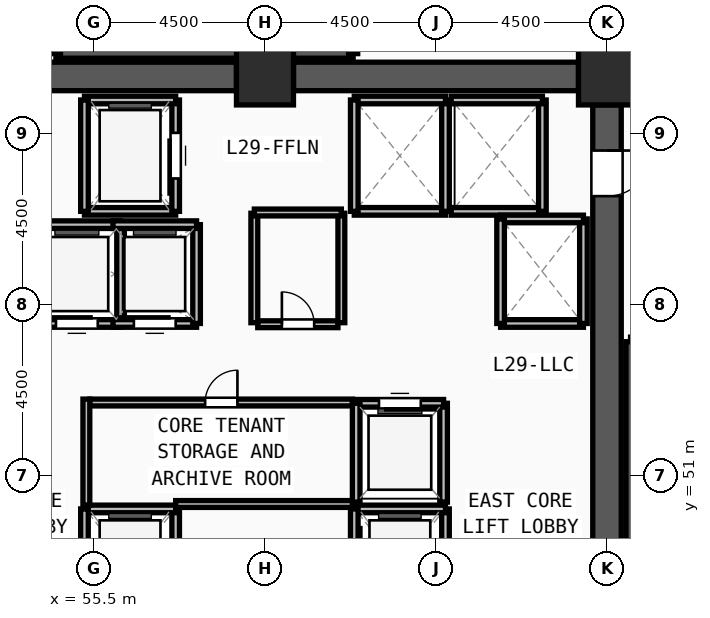
"""IFC4 building model, lengths in metres.
Left out: names, types, materials, properties, quantities, classifications, styles, units other than length and angle.
Written with IfcOpenShell. Run it as: python <this file> out.ifc"""

import sys

from ifc_helpers import new_model, si_unit, direction, frame, frame_2d, origin, origin_2d, place, context, subcontext, project, spatial, rectangle, extrude, source, transform, mapped, element, fill, save


model = new_model("IFC4")
c1 = context("Model", 3, precision=1e-05, world=origin(), true_north=direction((0.0, 1.0)))
c2 = subcontext(c1, "Body", "Model", "MODEL_VIEW")
j1 = project(units=[si_unit("LENGTHUNIT", "METRE"), si_unit("PLANEANGLEUNIT", "RADIAN")], contexts=[c1])
p1 = place(None, origin())
s1 = spatial("IfcSite", under=j1, at=p1, CompositionType="ELEMENT")
p2 = place(p1, origin())
s2 = spatial("IfcBuilding", under=s1, at=p2, CompositionType="ELEMENT")
p3 = place(p2, frame((0.0, 0.0, 113.25)))
s3 = spatial("IfcBuildingStorey", under=s2, at=p3, CompositionType="ELEMENT", Elevation=113.25)
m1 = source(origin(), c2, "Body", "SweptSolid", [
    extrude(rectangle(XDim=1.5, YDim=1.5, at=origin_2d()), origin(), (0.0, 0.0, 1.0), 3.75),
])
for number, where, z_axis, x_axis in (
    (1, (69.0, 61.5, 0.0), (0.0, 0.0, 1.0), (1.0, 0.0, 0.0)),
    (2, (60.0, 61.5, 0.0), (0.0, 0.0, 1.0), (1.0, 0.0, 0.0)),
):
    element("IfcColumn", number, at=place(p3, frame(where, z_axis=z_axis, x_axis=x_axis)), inside=s3, PredefinedType="COLUMN", context=c2, shape_type="MappedRepresentation", body=[
        mapped(m1, transform((0.0, 0.0, 0.0), x_axis=(1.0, 0.0, 0.0), y_axis=(0.0, 1.0, 0.0), z_axis=(0.0, 0.0, 1.0), scale=1.0)),
    ])
for number, where, z_axis, x_axis in (
    (3, (51.75, 61.5, 0.0), (0.0, 0.0, 1.0), (1.0, 0.0, 0.0)),
    (4, (60.75, 61.5, 0.0), (0.0, 0.0, 1.0), (1.0, 0.0, 0.0)),
):
    element("IfcWall", number, at=place(p3, frame(where, z_axis=z_axis, x_axis=x_axis)), inside=s3, PredefinedType="SHEAR", context=c2, shape_type="SweptSolid", body=[
        extrude(rectangle(XDim=7.5, YDim=0.75, at=frame_2d((3.75, 0.0))), origin(), (0.0, 0.0, 1.0), 3.57),
    ])
p4 = place(p3, frame((69.0, 60.75, 0.0), z_axis=(0.0, 0.0, 1.0), x_axis=(0.0, -1.0, 0.0)))
e5 = element("IfcWall", 5, at=p4, inside=s3, PredefinedType="SHEAR", context=c2, shape_type="SweptSolid", body=[
    extrude(rectangle(XDim=13.5, YDim=0.75, at=frame_2d((6.75, 0.0))), origin(), (0.0, 0.0, 1.0), 3.57),
])
m2 = source(origin(), c2, "Body", "SweptSolid", [
    extrude(rectangle(XDim=1.2, YDim=2.2, at=frame_2d((0.6, 1.1))), frame((0.0, 0.385, 0.0), z_axis=(0.0, -1.0, 0.0), x_axis=(1.0, 0.0, 0.0)), (0.0, 0.0, 1.0), 0.77),
])
p5 = place(p4, frame((1.2, 0.0, 0.0)))
e6 = element("IfcOpeningElement", 6, at=p5, cuts=e5, PredefinedType="OPENING", context=c2, shape_type="MappedRepresentation", body=[
    mapped(m2, transform((0.0, 0.0, 0.0), x_axis=(1.0, 0.0, 0.0), y_axis=(0.0, 1.0, 0.0), z_axis=(0.0, 0.0, 1.0), scale=1.0)),
])
for number, where, z_axis, x_axis in (
    (7, (69.62, 54.52, 0.0), (0.0, 0.0, 1.0), (0.0, -1.0, 0.0)),
    (8, (54.5, 62.1, 0.0), (0.0, 0.0, 1.0), (1.0, 0.0, 0.0)),
):
    element("IfcWall", number, at=place(p3, frame(where, z_axis=z_axis, x_axis=x_axis)), inside=s3, PredefinedType="SOLIDWALL", context=c2, shape_type="SweptSolid", body=[
        extrude(rectangle(XDim=7.82, YDim=0.24, at=frame_2d((3.91, 0.0))), origin(), (0.0, 0.0, 1.0), 3.57),
    ])
for number, where, z_axis, x_axis in (
    (9, (62.32, 62.1, 0.0), (0.0, 0.0, 1.0), (0.0, 1.0, 0.0)),
    (10, (54.5, 65.54, 0.0), (0.0, 0.0, 1.0), (0.0, -1.0, 0.0)),
):
    element("IfcWall", number, at=place(p3, frame(where, z_axis=z_axis, x_axis=x_axis)), inside=s3, PredefinedType="SOLIDWALL", context=c2, shape_type="SweptSolid", body=[
        extrude(rectangle(XDim=3.44, YDim=0.24, at=frame_2d((1.72, 0.0))), origin(), (0.0, 0.0, 1.0), 3.57),
    ])
p6 = place(p3, frame((57.65, 47.12, 0.0), z_axis=(0.0, 0.0, 1.0), x_axis=(0.0, 1.0, 0.0)))
e11 = element("IfcWall", 11, at=p6, inside=s3, PredefinedType="SOLIDWALL", context=c2, shape_type="SweptSolid", body=[
    extrude(rectangle(XDim=3.0, YDim=0.2, at=frame_2d((1.5, 0.0))), origin(), (0.0, 0.0, 1.0), 3.57),
])
m3 = source(origin(), c2, "Body", "SweptSolid", [
    extrude(rectangle(XDim=1.2, YDim=2.3, at=frame_2d((0.6, 1.15))), frame((0.0, 0.11, 0.0), z_axis=(0.0, -1.0, 0.0), x_axis=(1.0, 0.0, 0.0)), (0.0, 0.0, 1.0), 0.22),
])
p7 = place(p6, frame((0.9, 0.0, 0.0)))
e12 = element("IfcOpeningElement", 12, at=p7, cuts=e11, PredefinedType="OPENING", context=c2, shape_type="MappedRepresentation", body=[
    mapped(m3, transform((0.0, 0.0, 0.0), x_axis=(1.0, 0.0, 0.0), y_axis=(0.0, 1.0, 0.0), z_axis=(0.0, 0.0, 1.0), scale=1.0)),
])
p8 = place(p3, frame((57.65, 50.12, 0.0), z_axis=(0.0, 0.0, 1.0), x_axis=(-1.0, 0.0, 0.0)))
e13 = element("IfcWall", 13, at=p8, inside=s3, PredefinedType="SOLIDWALL", context=c2, shape_type="SweptSolid", body=[
    extrude(rectangle(XDim=2.4, YDim=0.2, at=frame_2d((1.2, 0.0))), origin(), (0.0, 0.0, 1.0), 3.57),
])
for number, where, z_axis, x_axis in (
    (14, (55.25, 50.12, 0.0), (0.0, 0.0, 1.0), (0.0, -1.0, 0.0)),
    (15, (64.75, 47.12, 0.0), (0.0, 0.0, 1.0), (0.0, 1.0, 0.0)),
):
    element("IfcWall", number, at=place(p3, frame(where, z_axis=z_axis, x_axis=x_axis)), inside=s3, PredefinedType="SOLIDWALL", context=c2, shape_type="SweptSolid", body=[
        extrude(rectangle(XDim=3.0, YDim=0.2, at=frame_2d((1.5, 0.0))), origin(), (0.0, 0.0, 1.0), 3.57),
    ])
p9 = place(p3, frame((64.75, 50.12, 0.0), z_axis=(0.0, 0.0, 1.0), x_axis=(-1.0, 0.0, 0.0)))
e16 = element("IfcWall", 16, at=p9, inside=s3, PredefinedType="SOLIDWALL", context=c2, shape_type="SweptSolid", body=[
    extrude(rectangle(XDim=2.4, YDim=0.2, at=frame_2d((1.2, 0.0))), origin(), (0.0, 0.0, 1.0), 3.57),
])
p10 = place(p3, frame((62.35, 50.12, 0.0), z_axis=(0.0, 0.0, 1.0), x_axis=(0.0, -1.0, 0.0)))
e17 = element("IfcWall", 17, at=p10, inside=s3, PredefinedType="SOLIDWALL", context=c2, shape_type="SweptSolid", body=[
    extrude(rectangle(XDim=3.0, YDim=0.2, at=frame_2d((1.5, 0.0))), origin(), (0.0, 0.0, 1.0), 3.57),
])
p11 = place(p10, frame((0.9, 0.0, 0.0)))
e18 = element("IfcOpeningElement", 18, at=p11, cuts=e17, PredefinedType="OPENING", context=c2, shape_type="MappedRepresentation", body=[
    mapped(m3, transform((0.0, 0.0, 0.0), x_axis=(1.0, 0.0, 0.0), y_axis=(0.0, 1.0, 0.0), z_axis=(0.0, 0.0, 1.0), scale=1.0)),
])
p12 = place(p3, frame((55.25, 57.95, 0.0), z_axis=(0.0, 0.0, 1.0), x_axis=(1.0, 0.0, 0.0)))
e19 = element("IfcWall", 19, at=p12, inside=s3, PredefinedType="SOLIDWALL", context=c2, shape_type="SweptSolid", body=[
    extrude(rectangle(XDim=2.4, YDim=0.2, at=frame_2d((1.2, 0.0))), origin(), (0.0, 0.0, 1.0), 3.57),
])
p13 = place(p3, frame((57.65, 57.95, 0.0), z_axis=(0.0, 0.0, 1.0), x_axis=(0.0, 1.0, 0.0)))
e20 = element("IfcWall", 20, at=p13, inside=s3, PredefinedType="SOLIDWALL", context=c2, shape_type="SweptSolid", body=[
    extrude(rectangle(XDim=2.93, YDim=0.2, at=frame_2d((1.465, 0.0))), origin(), (0.0, 0.0, 1.0), 3.57),
])
p14 = place(p13, frame((0.865, 0.0, 0.0)))
e21 = element("IfcOpeningElement", 21, at=p14, cuts=e20, PredefinedType="OPENING", context=c2, shape_type="MappedRepresentation", body=[
    mapped(m3, transform((0.0, 0.0, 0.0), x_axis=(1.0, 0.0, 0.0), y_axis=(0.0, 1.0, 0.0), z_axis=(0.0, 0.0, 1.0), scale=1.0)),
])
p15 = place(p3, frame((57.65, 60.88, 0.0), z_axis=(0.0, 0.0, 1.0), x_axis=(-1.0, 0.0, 0.0)))
e22 = element("IfcWall", 22, at=p15, inside=s3, PredefinedType="SOLIDWALL", context=c2, shape_type="SweptSolid", body=[
    extrude(rectangle(XDim=2.4, YDim=0.2, at=frame_2d((1.2, 0.0))), origin(), (0.0, 0.0, 1.0), 3.57),
])
p16 = place(p3, frame((55.25, 60.88, 0.0), z_axis=(0.0, 0.0, 1.0), x_axis=(0.0, -1.0, 0.0)))
e23 = element("IfcWall", 23, at=p16, inside=s3, PredefinedType="SOLIDWALL", context=c2, shape_type="SweptSolid", body=[
    extrude(rectangle(XDim=2.93, YDim=0.2, at=frame_2d((1.465, 0.0))), origin(), (0.0, 0.0, 1.0), 3.57),
])
p17 = place(p3, frame((62.35, 57.95, 0.0), z_axis=(0.0, 0.0, 1.0), x_axis=(1.0, 0.0, 0.0)))
e24 = element("IfcWall", 24, at=p17, inside=s3, PredefinedType="SOLIDWALL", context=c2, shape_type="SweptSolid", body=[
    extrude(rectangle(XDim=2.4, YDim=0.2, at=frame_2d((1.2, 0.0))), origin(), (0.0, 0.0, 1.0), 3.57),
])
p18 = place(p3, frame((64.75, 57.95, 0.0), z_axis=(0.0, 0.0, 1.0), x_axis=(0.0, 1.0, 0.0)))
e25 = element("IfcWall", 25, at=p18, inside=s3, PredefinedType="SOLIDWALL", context=c2, shape_type="SweptSolid", body=[
    extrude(rectangle(XDim=2.93, YDim=0.2, at=frame_2d((1.465, 0.0))), origin(), (0.0, 0.0, 1.0), 3.57),
])
p19 = place(p3, frame((64.75, 60.88, 0.0), z_axis=(0.0, 0.0, 1.0), x_axis=(-1.0, 0.0, 0.0)))
e26 = element("IfcWall", 26, at=p19, inside=s3, PredefinedType="SOLIDWALL", context=c2, shape_type="SweptSolid", body=[
    extrude(rectangle(XDim=2.4, YDim=0.2, at=frame_2d((1.2, 0.0))), origin(), (0.0, 0.0, 1.0), 3.57),
])
p20 = place(p3, frame((62.35, 60.88, 0.0), z_axis=(0.0, 0.0, 1.0), x_axis=(0.0, -1.0, 0.0)))
e27 = element("IfcWall", 27, at=p20, inside=s3, PredefinedType="SOLIDWALL", context=c2, shape_type="SweptSolid", body=[
    extrude(rectangle(XDim=2.93, YDim=0.2, at=frame_2d((1.465, 0.0))), origin(), (0.0, 0.0, 1.0), 3.57),
])
p21 = place(p3, frame((64.9, 57.95, 0.0), z_axis=(0.0, 0.0, 1.0), x_axis=(1.0, 0.0, 0.0)))
e28 = element("IfcWall", 28, at=p21, inside=s3, PredefinedType="SOLIDWALL", context=c2, shape_type="SweptSolid", body=[
    extrude(rectangle(XDim=2.4, YDim=0.2, at=frame_2d((1.2, 0.0))), origin(), (0.0, 0.0, 1.0), 3.57),
])
p22 = place(p3, frame((67.3, 57.95, 0.0), z_axis=(0.0, 0.0, 1.0), x_axis=(0.0, 1.0, 0.0)))
e29 = element("IfcWall", 29, at=p22, inside=s3, PredefinedType="SOLIDWALL", context=c2, shape_type="SweptSolid", body=[
    extrude(rectangle(XDim=2.93, YDim=0.2, at=frame_2d((1.465, 0.0))), origin(), (0.0, 0.0, 1.0), 3.57),
])
p23 = place(p3, frame((67.3, 60.88, 0.0), z_axis=(0.0, 0.0, 1.0), x_axis=(-1.0, 0.0, 0.0)))
e30 = element("IfcWall", 30, at=p23, inside=s3, PredefinedType="SOLIDWALL", context=c2, shape_type="SweptSolid", body=[
    extrude(rectangle(XDim=2.4, YDim=0.2, at=frame_2d((1.2, 0.0))), origin(), (0.0, 0.0, 1.0), 3.57),
])
p24 = place(p3, frame((66.2, 55.0, 0.0), z_axis=(0.0, 0.0, 1.0), x_axis=(1.0, 0.0, 0.0)))
e31 = element("IfcWall", 31, at=p24, inside=s3, PredefinedType="SOLIDWALL", context=c2, shape_type="SweptSolid", body=[
    extrude(rectangle(XDim=2.18, YDim=0.2, at=frame_2d((1.09, 0.0))), origin(), (0.0, 0.0, 1.0), 3.57),
])
p25 = place(p3, frame((68.38, 55.0, 0.0), z_axis=(0.0, 0.0, 1.0), x_axis=(0.0, 1.0, 0.0)))
e32 = element("IfcWall", 32, at=p25, inside=s3, PredefinedType="SOLIDWALL", context=c2, shape_type="SweptSolid", body=[
    extrude(rectangle(XDim=2.75, YDim=0.2, at=frame_2d((1.375, 0.0))), origin(), (0.0, 0.0, 1.0), 3.57),
])
p26 = place(p3, frame((68.38, 57.75, 0.0), z_axis=(0.0, 0.0, 1.0), x_axis=(-1.0, 0.0, 0.0)))
e33 = element("IfcWall", 33, at=p26, inside=s3, PredefinedType="SOLIDWALL", context=c2, shape_type="SweptSolid", body=[
    extrude(rectangle(XDim=2.18, YDim=0.2, at=frame_2d((1.09, 0.0))), origin(), (0.0, 0.0, 1.0), 3.57),
])
p27 = place(p3, frame((66.2, 57.75, 0.0), z_axis=(0.0, 0.0, 1.0), x_axis=(0.0, -1.0, 0.0)))
e34 = element("IfcWall", 34, at=p27, inside=s3, PredefinedType="SOLIDWALL", context=c2, shape_type="SweptSolid", body=[
    extrude(rectangle(XDim=2.75, YDim=0.2, at=frame_2d((1.375, 0.0))), origin(), (0.0, 0.0, 1.0), 3.57),
])
p28 = place(p3, frame((64.7, 50.3, 0.0), z_axis=(0.0, 0.0, 1.0), x_axis=(0.0, 1.0, 0.0)))
e35 = element("IfcWall", 35, at=p28, inside=s3, PredefinedType="SOLIDWALL", context=c2, shape_type="SweptSolid", body=[
    extrude(rectangle(XDim=2.6, YDim=0.2, at=frame_2d((1.3, 0.0))), origin(), (0.0, 0.0, 1.0), 3.57),
])
p29 = place(p3, frame((64.7, 52.9, 0.0), z_axis=(0.0, 0.0, 1.0), x_axis=(-1.0, 0.0, 0.0)))
e36 = element("IfcWall", 36, at=p29, inside=s3, PredefinedType="SOLIDWALL", context=c2, shape_type="SweptSolid", body=[
    extrude(rectangle(XDim=2.3, YDim=0.2, at=frame_2d((1.15, 0.0))), origin(), (0.0, 0.0, 1.0), 3.57),
])
m4 = source(origin(), c2, "Body", "SweptSolid", [
    extrude(rectangle(XDim=1.1, YDim=2.2, at=frame_2d((0.55, 1.1))), frame((0.0, 0.11, 0.0), z_axis=(0.0, -1.0, 0.0), x_axis=(1.0, 0.0, 0.0)), (0.0, 0.0, 1.0), 0.22),
])
p30 = place(p29, frame((0.6, 0.0, 0.0)))
e37 = element("IfcOpeningElement", 37, at=p30, cuts=e36, PredefinedType="OPENING", context=c2, shape_type="MappedRepresentation", body=[
    mapped(m4, transform((0.0, 0.0, 0.0), x_axis=(1.0, 0.0, 0.0), y_axis=(0.0, 1.0, 0.0), z_axis=(0.0, 0.0, 1.0), scale=1.0)),
])
p31 = place(p3, frame((62.4, 52.9, 0.0), z_axis=(0.0, 0.0, 1.0), x_axis=(0.0, -1.0, 0.0)))
e38 = element("IfcWall", 38, at=p31, inside=s3, PredefinedType="SOLIDWALL", context=c2, shape_type="SweptSolid", body=[
    extrude(rectangle(XDim=2.6, YDim=0.2, at=frame_2d((1.3, 0.0))), origin(), (0.0, 0.0, 1.0), 3.57),
])
p32 = place(p3, frame((53.9, 55.0, 0.0), z_axis=(0.0, 0.0, 1.0), x_axis=(1.0, 0.0, 0.0)))
e39 = element("IfcWall", 39, at=p32, inside=s3, PredefinedType="SOLIDWALL", context=c2, shape_type="SweptSolid", body=[
    extrude(rectangle(XDim=2.3, YDim=0.2, at=frame_2d((1.15, 0.0))), origin(), (0.0, 0.0, 1.0), 3.57),
])
p33 = place(p32, frame((0.6, 0.0, 0.0)))
e40 = element("IfcOpeningElement", 40, at=p33, cuts=e39, PredefinedType="OPENING", context=c2, shape_type="MappedRepresentation", body=[
    mapped(m4, transform((0.0, 0.0, 0.0), x_axis=(1.0, 0.0, 0.0), y_axis=(0.0, 1.0, 0.0), z_axis=(0.0, 0.0, 1.0), scale=1.0)),
])
p34 = place(p3, frame((56.2, 55.0, 0.0), z_axis=(0.0, 0.0, 1.0), x_axis=(0.0, 1.0, 0.0)))
e41 = element("IfcWall", 41, at=p34, inside=s3, PredefinedType="SOLIDWALL", context=c2, shape_type="SweptSolid", body=[
    extrude(rectangle(XDim=2.6, YDim=0.2, at=frame_2d((1.3, 0.0))), origin(), (0.0, 0.0, 1.0), 3.57),
])
p35 = place(p3, frame((56.2, 57.6, 0.0), z_axis=(0.0, 0.0, 1.0), x_axis=(-1.0, 0.0, 0.0)))
e42 = element("IfcWall", 42, at=p35, inside=s3, PredefinedType="SOLIDWALL", context=c2, shape_type="SweptSolid", body=[
    extrude(rectangle(XDim=2.3, YDim=0.2, at=frame_2d((1.15, 0.0))), origin(), (0.0, 0.0, 1.0), 3.57),
])
p36 = place(p3, frame((56.0, 55.0, 0.0), z_axis=(0.0, 0.0, 1.0), x_axis=(1.0, 0.0, 0.0)))
e43 = element("IfcWall", 43, at=p36, inside=s3, PredefinedType="SOLIDWALL", context=c2, shape_type="SweptSolid", body=[
    extrude(rectangle(XDim=2.2, YDim=0.2, at=frame_2d((1.1, 0.0))), origin(), (0.0, 0.0, 1.0), 3.57),
])
p37 = place(p36, frame((0.55, 0.0, 0.0)))
e44 = element("IfcOpeningElement", 44, at=p37, cuts=e43, PredefinedType="OPENING", context=c2, shape_type="MappedRepresentation", body=[
    mapped(m4, transform((0.0, 0.0, 0.0), x_axis=(1.0, 0.0, 0.0), y_axis=(0.0, 1.0, 0.0), z_axis=(0.0, 0.0, 1.0), scale=1.0)),
])
p38 = place(p3, frame((58.2, 55.0, 0.0), z_axis=(0.0, 0.0, 1.0), x_axis=(0.0, 1.0, 0.0)))
e45 = element("IfcWall", 45, at=p38, inside=s3, PredefinedType="SOLIDWALL", context=c2, shape_type="SweptSolid", body=[
    extrude(rectangle(XDim=2.6, YDim=0.2, at=frame_2d((1.3, 0.0))), origin(), (0.0, 0.0, 1.0), 3.57),
])
p39 = place(p3, frame((58.2, 57.6, 0.0), z_axis=(0.0, 0.0, 1.0), x_axis=(-1.0, 0.0, 0.0)))
e46 = element("IfcWall", 46, at=p39, inside=s3, PredefinedType="SOLIDWALL", context=c2, shape_type="SweptSolid", body=[
    extrude(rectangle(XDim=2.2, YDim=0.2, at=frame_2d((1.1, 0.0))), origin(), (0.0, 0.0, 1.0), 3.57),
])
p40 = place(p3, frame((55.39, 52.92, 0.0), z_axis=(0.0, 0.0, 1.0), x_axis=(1.0, 0.0, 0.0)))
e47 = element("IfcWall", 47, at=p40, inside=s3, PredefinedType="PARTITIONING", context=c2, shape_type="SweptSolid", body=[
    extrude(rectangle(XDim=6.91, YDim=0.18, at=frame_2d((3.455, 0.0))), origin(), (0.0, 0.0, 1.0), 3.57),
])
m5 = source(origin(), c2, "Body", "SweptSolid", [
    extrude(rectangle(XDim=0.85, YDim=2.1, at=frame_2d((0.425, 1.05))), frame((0.0, 0.1, 0.0), z_axis=(0.0, -1.0, 0.0), x_axis=(1.0, 0.0, 0.0)), (0.0, 0.0, 1.0), 0.2),
])
p41 = place(p40, frame((3.035, 0.0, 0.0)))
e48 = element("IfcOpeningElement", 48, at=p41, cuts=e47, PredefinedType="OPENING", context=c2, shape_type="MappedRepresentation", body=[
    mapped(m5, transform((0.0, 0.0, 0.0), x_axis=(1.0, 0.0, 0.0), y_axis=(0.0, 1.0, 0.0), z_axis=(0.0, 0.0, 1.0), scale=1.0)),
])
p42 = place(p3, frame((59.81, 54.98, 0.0), z_axis=(0.0, 0.0, 1.0), x_axis=(1.0, 0.0, 0.0)))
e49 = element("IfcWall", 49, at=p42, inside=s3, PredefinedType="PARTITIONING", context=c2, shape_type="SweptSolid", body=[
    extrude(rectangle(XDim=2.11, YDim=0.18, at=frame_2d((1.055, 0.0))), origin(), (0.0, 0.0, 1.0), 3.57),
])
p43 = place(p42, frame((0.635, 0.0, 0.0)))
e50 = element("IfcOpeningElement", 50, at=p43, cuts=e49, PredefinedType="OPENING", context=c2, shape_type="MappedRepresentation", body=[
    mapped(m5, transform((0.0, 0.0, 0.0), x_axis=(1.0, 0.0, 0.0), y_axis=(0.0, 1.0, 0.0), z_axis=(0.0, 0.0, 1.0), scale=1.0)),
])
for number, where, z_axis, x_axis in (
    (51, (59.72, 55.02, 0.0), (0.0, 0.0, 1.0), (0.0, 1.0, 0.0)),
    (52, (62.01, 55.02, 0.0), (0.0, 0.0, 1.0), (0.0, 1.0, 0.0)),
):
    element("IfcWall", number, at=place(p3, frame(where, z_axis=z_axis, x_axis=x_axis)), inside=s3, PredefinedType="PARTITIONING", context=c2, shape_type="SweptSolid", body=[
        extrude(rectangle(XDim=2.88, YDim=0.18, at=frame_2d((1.44, 0.0))), origin(), (0.0, 0.0, 1.0), 3.57),
    ])
p44 = place(p3, frame((59.72, 57.92, 0.0), z_axis=(0.0, 0.0, 1.0), x_axis=(1.0, 0.0, 0.0)))
e53 = element("IfcWall", 53, at=p44, inside=s3, PredefinedType="PARTITIONING", context=c2, shape_type="SweptSolid", body=[
    extrude(rectangle(XDim=2.29, YDim=0.18, at=frame_2d((1.145, 0.0))), origin(), (0.0, 0.0, 1.0), 3.57),
])
p45 = place(p3, frame((69.46, 61.95, 0.0), z_axis=(0.0, 0.0, 1.0), x_axis=(0.0, 1.0, 0.0)))
e54 = element("IfcWall", 54, at=p45, inside=s3, PredefinedType="PARTITIONING", context=c2, shape_type="SweptSolid", body=[
    extrude(rectangle(XDim=3.63, YDim=0.18, at=frame_2d((1.815, 0.0))), origin(), (0.0, 0.0, 1.0), 3.57),
])
p46 = place(p3, frame((55.3, 50.22, 0.0), z_axis=(0.0, 0.0, 1.0), x_axis=(0.0, 1.0, 0.0)))
e55 = element("IfcWall", 55, at=p46, inside=s3, PredefinedType="PARTITIONING", context=c2, shape_type="SweptSolid", body=[
    extrude(rectangle(XDim=2.79, YDim=0.18, at=frame_2d((1.395, 0.0))), origin(), (0.0, 0.0, 1.0), 3.57),
])
p47 = place(p3, frame((57.65, 50.25, 0.0), z_axis=(0.0, 0.0, 1.0), x_axis=(1.0, 0.0, 0.0)))
e56 = element("IfcWall", 56, at=p47, inside=s3, PredefinedType="PARTITIONING", context=c2, shape_type="SweptSolid", body=[
    extrude(rectangle(XDim=4.65, YDim=0.18, at=frame_2d((2.325, 0.0))), origin(), (0.0, 0.0, 1.0), 3.57),
])
m6 = source(origin(), c2, "Body", "SweptSolid", [
    extrude(rectangle(XDim=1.2, YDim=2.2, at=frame_2d((0.6, 1.1))), frame((0.0, 0.025, 0.0), z_axis=(0.0, -1.0, 0.0), x_axis=(1.0, 0.0, 0.0)), (0.0, 0.0, 1.0), 0.05),
])
p48 = place(p5, origin())
e57 = element("IfcDoor", 57, at=p48, inside=s3, OperationType="SINGLE_SWING_LEFT", PredefinedType="DOOR", context=c2, shape_type="MappedRepresentation", body=[
    mapped(m6, transform((0.0, 0.0, 0.0), x_axis=(1.0, 0.0, 0.0), y_axis=(0.0, 1.0, 0.0), z_axis=(0.0, 0.0, 1.0), scale=1.0)),
])
fill(e6, e57)
m7 = source(origin(), c2, "Body", "SweptSolid", [
    extrude(rectangle(XDim=1.2, YDim=2.3, at=frame_2d((0.6, 1.15))), frame((0.0, 0.025, 0.0), z_axis=(0.0, -1.0, 0.0), x_axis=(1.0, 0.0, 0.0)), (0.0, 0.0, 1.0), 0.05),
])
p49 = place(p14, origin())
e58 = element("IfcDoor", 58, at=p49, inside=s3, OperationType="SLIDING_TO_LEFT", PredefinedType="DOOR", context=c2, shape_type="MappedRepresentation", body=[
    mapped(m7, transform((0.0, 0.0, 0.0), x_axis=(1.0, 0.0, 0.0), y_axis=(0.0, 1.0, 0.0), z_axis=(0.0, 0.0, 1.0), scale=1.0)),
])
fill(e21, e58)
m8 = source(origin(), c2, "Body", "SweptSolid", [
    extrude(rectangle(XDim=1.1, YDim=2.2, at=frame_2d((0.55, 1.1))), frame((0.0, 0.025, 0.0), z_axis=(0.0, -1.0, 0.0), x_axis=(1.0, 0.0, 0.0)), (0.0, 0.0, 1.0), 0.05),
])
p50 = place(p30, origin())
e59 = element("IfcDoor", 59, at=p50, inside=s3, OperationType="SLIDING_TO_LEFT", PredefinedType="DOOR", context=c2, shape_type="MappedRepresentation", body=[
    mapped(m8, transform((0.0, 0.0, 0.0), x_axis=(1.0, 0.0, 0.0), y_axis=(0.0, 1.0, 0.0), z_axis=(0.0, 0.0, 1.0), scale=1.0)),
])
fill(e37, e59)
p51 = place(p33, origin())
e60 = element("IfcDoor", 60, at=p51, inside=s3, OperationType="SLIDING_TO_LEFT", PredefinedType="DOOR", context=c2, shape_type="MappedRepresentation", body=[
    mapped(m8, transform((0.0, 0.0, 0.0), x_axis=(1.0, 0.0, 0.0), y_axis=(0.0, 1.0, 0.0), z_axis=(0.0, 0.0, 1.0), scale=1.0)),
])
fill(e40, e60)
p52 = place(p37, origin())
e61 = element("IfcDoor", 61, at=p52, inside=s3, OperationType="SLIDING_TO_LEFT", PredefinedType="DOOR", context=c2, shape_type="MappedRepresentation", body=[
    mapped(m8, transform((0.0, 0.0, 0.0), x_axis=(1.0, 0.0, 0.0), y_axis=(0.0, 1.0, 0.0), z_axis=(0.0, 0.0, 1.0), scale=1.0)),
])
fill(e44, e61)
m9 = source(origin(), c2, "Body", "SweptSolid", [
    extrude(rectangle(XDim=0.85, YDim=2.1, at=frame_2d((0.425, 1.05))), frame((0.0, 0.025, 0.0), z_axis=(0.0, -1.0, 0.0), x_axis=(1.0, 0.0, 0.0)), (0.0, 0.0, 1.0), 0.05),
])
p53 = place(p41, origin())
e62 = element("IfcDoor", 62, at=p53, inside=s3, OperationType="SINGLE_SWING_RIGHT", PredefinedType="DOOR", context=c2, shape_type="MappedRepresentation", body=[
    mapped(m9, transform((0.0, 0.0, 0.0), x_axis=(1.0, 0.0, 0.0), y_axis=(0.0, 1.0, 0.0), z_axis=(0.0, 0.0, 1.0), scale=1.0)),
])
fill(e48, e62)
p54 = place(p43, origin())
e63 = element("IfcDoor", 63, at=p54, inside=s3, OperationType="SINGLE_SWING_LEFT", PredefinedType="DOOR", context=c2, shape_type="MappedRepresentation", body=[
    mapped(m9, transform((0.0, 0.0, 0.0), x_axis=(1.0, 0.0, 0.0), y_axis=(0.0, 1.0, 0.0), z_axis=(0.0, 0.0, 1.0), scale=1.0)),
])
fill(e50, e63)
save(model, sys.argv[1])
